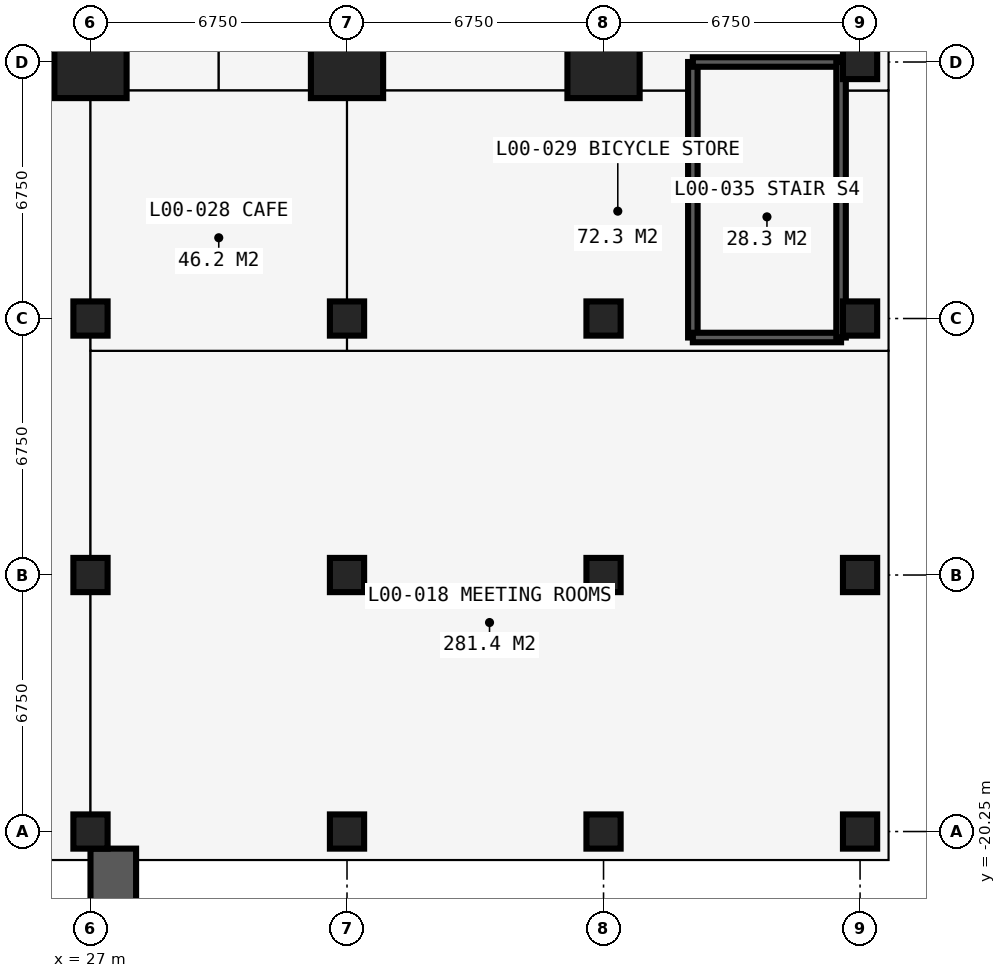
"""IFC4 building model, lengths in metres.
Left out: names, types, materials, properties, quantities, classifications, styles, units other than length and angle.
Written with IfcOpenShell. Run it as: python <this file> out.ifc"""

import sys

from ifc_helpers import new_model, si_unit, direction, frame, frame_2d, origin, origin_2d, place, context, subcontext, project, spatial, rectangle, circle, extrude, element, fill, save


model = new_model("IFC4")
c1 = context("Model", 3, precision=1e-05, world=origin(), true_north=direction((0.0, 1.0)))
c2 = subcontext(c1, "Body", "Model", "MODEL_VIEW")
j1 = project(units=[si_unit("LENGTHUNIT", "METRE"), si_unit("PLANEANGLEUNIT", "RADIAN")], contexts=[c1])
p1 = place(None, origin())
s1 = spatial("IfcSite", under=j1, at=p1, CompositionType="ELEMENT")
p2 = place(p1, origin())
s2 = spatial("IfcBuilding", under=s1, at=p2, CompositionType="ELEMENT")
p3 = place(p2, origin())
s3 = spatial("IfcBuildingStorey", under=s2, at=p3, CompositionType="ELEMENT", Elevation=0.0)
for number, where, z_axis, x_axis in (
    (1, (27.0, -20.25, 0.0), (0.0, 0.0, 1.0), (1.0, 0.0, 0.0)),
    (2, (27.0, -13.5, 0.0), (0.0, 0.0, 1.0), (1.0, 0.0, 0.0)),
    (3, (27.0, -6.75, 0.0), (0.0, 0.0, 1.0), (1.0, 0.0, 0.0)),
):
    element("IfcColumn", number, at=place(p3, frame(where, z_axis=z_axis, x_axis=x_axis)), inside=s3, PredefinedType="COLUMN", context=c2, shape_type="SweptSolid", body=[
        extrude(circle(Radius=0.45, at=origin_2d()), origin(), (0.0, 0.0, 1.0), 4.5),
    ])
p4 = place(p3, frame((27.0, 0.0, 0.0), z_axis=(0.0, 0.0, 1.0), x_axis=(1.0, 0.0, 0.0)))
e4 = element("IfcColumn", 4, at=p4, inside=s3, PredefinedType="COLUMN", context=c2, shape_type="SweptSolid", body=[
    extrude(rectangle(XDim=1.9, YDim=1.9, at=origin_2d()), origin(), (0.0, 0.0, 1.0), 4.5),
])
for number, where, z_axis, x_axis in (
    (5, (33.75, -20.25, 0.0), (0.0, 0.0, 1.0), (1.0, 0.0, 0.0)),
    (6, (33.75, -13.5, 0.0), (0.0, 0.0, 1.0), (1.0, 0.0, 0.0)),
    (7, (33.75, -6.75, 0.0), (0.0, 0.0, 1.0), (1.0, 0.0, 0.0)),
):
    element("IfcColumn", number, at=place(p3, frame(where, z_axis=z_axis, x_axis=x_axis)), inside=s3, PredefinedType="COLUMN", context=c2, shape_type="SweptSolid", body=[
        extrude(circle(Radius=0.45, at=origin_2d()), origin(), (0.0, 0.0, 1.0), 4.5),
    ])
p5 = place(p3, frame((33.75, 0.0, 0.0), z_axis=(0.0, 0.0, 1.0), x_axis=(1.0, 0.0, 0.0)))
e8 = element("IfcColumn", 8, at=p5, inside=s3, PredefinedType="COLUMN", context=c2, shape_type="SweptSolid", body=[
    extrude(rectangle(XDim=1.9, YDim=1.9, at=origin_2d()), origin(), (0.0, 0.0, 1.0), 4.5),
])
for number, where, z_axis, x_axis in (
    (9, (40.5, -20.25, 0.0), (0.0, 0.0, 1.0), (1.0, 0.0, 0.0)),
    (10, (40.5, -13.5, 0.0), (0.0, 0.0, 1.0), (1.0, 0.0, 0.0)),
    (11, (40.5, -6.75, 0.0), (0.0, 0.0, 1.0), (1.0, 0.0, 0.0)),
):
    element("IfcColumn", number, at=place(p3, frame(where, z_axis=z_axis, x_axis=x_axis)), inside=s3, PredefinedType="COLUMN", context=c2, shape_type="SweptSolid", body=[
        extrude(circle(Radius=0.45, at=origin_2d()), origin(), (0.0, 0.0, 1.0), 4.5),
    ])
p6 = place(p3, frame((40.5, 0.0, 0.0), z_axis=(0.0, 0.0, 1.0), x_axis=(1.0, 0.0, 0.0)))
e12 = element("IfcColumn", 12, at=p6, inside=s3, PredefinedType="COLUMN", context=c2, shape_type="SweptSolid", body=[
    extrude(rectangle(XDim=1.9, YDim=1.9, at=origin_2d()), origin(), (0.0, 0.0, 1.0), 4.5),
])
for number, where, z_axis, x_axis in (
    (13, (47.25, -20.25, 0.0), (0.0, 0.0, 1.0), (1.0, 0.0, 0.0)),
    (14, (47.25, -13.5, 0.0), (0.0, 0.0, 1.0), (1.0, 0.0, 0.0)),
    (15, (47.25, -6.75, 0.0), (0.0, 0.0, 1.0), (1.0, 0.0, 0.0)),
    (16, (47.25, 0.0, 0.0), (0.0, 0.0, 1.0), (1.0, 0.0, 0.0)),
):
    element("IfcColumn", number, at=place(p3, frame(where, z_axis=z_axis, x_axis=x_axis)), inside=s3, PredefinedType="COLUMN", context=c2, shape_type="SweptSolid", body=[
        extrude(circle(Radius=0.45, at=origin_2d()), origin(), (0.0, 0.0, 1.0), 4.5),
    ])
p7 = place(p3, frame((48.0, -6.75, 0.0), z_axis=(0.0, 0.0, 1.0), x_axis=(0.0, -1.0, 0.0)))
e17 = element("IfcWall", 17, at=p7, inside=s3, PredefinedType="SOLIDWALL", context=c2, shape_type="SweptSolid", body=[
    extrude(rectangle(XDim=6.75, YDim=0.15, at=frame_2d((3.375, 0.0))), origin(), (0.0, 0.0, 1.0), 4.25),
])
p8 = place(p7, frame((2.625, 0.0, 0.0)))
e18 = element("IfcOpeningElement", 18, at=p8, cuts=e17, PredefinedType="OPENING", context=c2, shape_type="SweptSolid", body=[
    extrude(rectangle(XDim=1.5, YDim=2.4, at=frame_2d((0.75, 1.2))), frame((0.0, 0.085, 0.0), z_axis=(0.0, -1.0, 0.0), x_axis=(1.0, 0.0, 0.0)), (0.0, 0.0, 1.0), 0.17),
])
p9 = place(p3, frame((48.0, 0.0, 0.0), z_axis=(0.0, 0.0, 1.0), x_axis=(0.0, -1.0, 0.0)))
e19 = element("IfcWall", 19, at=p9, inside=s3, PredefinedType="SOLIDWALL", context=c2, shape_type="SweptSolid", body=[
    extrude(rectangle(XDim=6.75, YDim=0.15, at=frame_2d((3.375, 0.0))), origin(), (0.0, 0.0, 1.0), 4.25),
])
p10 = place(p9, frame((5.075, 0.0, 0.0)))
e20 = element("IfcOpeningElement", 20, at=p10, cuts=e19, PredefinedType="OPENING", context=c2, shape_type="SweptSolid", body=[
    extrude(rectangle(XDim=1.2, YDim=2.4, at=frame_2d((0.6, 1.2))), frame((0.0, 0.085, 0.0), z_axis=(0.0, -1.0, 0.0), x_axis=(1.0, 0.0, 0.0)), (0.0, 0.0, 1.0), 0.17),
])
p11 = place(p3, frame((27.0, -21.0, 0.0), z_axis=(0.0, 0.0, 1.0), x_axis=(-1.0, 0.0, 0.0)))
e21 = element("IfcWall", 21, at=p11, inside=s3, PredefinedType="SOLIDWALL", context=c2, shape_type="SweptSolid", body=[
    extrude(rectangle(XDim=6.75, YDim=0.15, at=frame_2d((3.375, 0.0))), origin(), (0.0, 0.0, 1.0), 4.25),
])
p12 = place(p11, frame((0.788, 0.0, 0.0)))
e22 = element("IfcOpeningElement", 22, at=p12, cuts=e21, PredefinedType="OPENING", context=c2, shape_type="SweptSolid", body=[
    extrude(rectangle(XDim=1.8, YDim=2.7, at=frame_2d((0.9, 1.35))), frame((0.0, 0.085, 0.0), z_axis=(0.0, -1.0, 0.0), x_axis=(1.0, 0.0, 0.0)), (0.0, 0.0, 1.0), 0.17),
])
p13 = place(p11, frame((4.163, 0.0, 0.0)))
e23 = element("IfcOpeningElement", 23, at=p13, cuts=e21, PredefinedType="OPENING", context=c2, shape_type="SweptSolid", body=[
    extrude(rectangle(XDim=1.8, YDim=2.7, at=frame_2d((0.9, 1.35))), frame((0.0, 0.085, 0.0), z_axis=(0.0, -1.0, 0.0), x_axis=(1.0, 0.0, 0.0)), (0.0, 0.0, 1.0), 0.17),
])
p14 = place(p3, frame((27.6, -20.7, 0.0), z_axis=(0.0, 0.0, 1.0), x_axis=(0.0, -1.0, 0.0)))
e24 = element("IfcWall", 24, at=p14, inside=s3, PredefinedType="USERDEFINED", context=c2, shape_type="SweptSolid", body=[
    extrude(rectangle(XDim=2.8, YDim=1.2, at=frame_2d((1.4, 0.0))), origin(), (0.0, 0.0, 1.0), 9.0),
])
p15 = place(p3, frame((27.0, -20.984, 0.0), z_axis=(0.0, 0.0, 1.0), x_axis=(0.0, 1.0, 0.0)))
e25 = element("IfcWall", 25, at=p15, inside=s3, PredefinedType="PARTITIONING", context=c2, shape_type="SweptSolid", body=[
    extrude(rectangle(XDim=20.234, YDim=0.15, at=frame_2d((10.117, 0.0))), origin(), (0.0, 0.0, 1.0), 3.752),
])
p16 = place(p15, frame((5.225, 0.0, 0.0)))
e26 = element("IfcOpeningElement", 26, at=p16, cuts=e25, PredefinedType="OPENING", context=c2, shape_type="SweptSolid", body=[
    extrude(rectangle(XDim=1.6, YDim=2.4, at=frame_2d((0.8, 1.2))), frame((0.0, 0.085, 0.0), z_axis=(0.0, -1.0, 0.0), x_axis=(1.0, 0.0, 0.0)), (0.0, 0.0, 1.0), 0.17),
])
p17 = place(p15, frame((15.984, 0.0, 0.0)))
e27 = element("IfcOpeningElement", 27, at=p17, cuts=e25, PredefinedType="OPENING", context=c2, shape_type="SweptSolid", body=[
    extrude(rectangle(XDim=1.6, YDim=2.4, at=frame_2d((0.8, 1.2))), frame((0.0, 0.085, 0.0), z_axis=(0.0, -1.0, 0.0), x_axis=(1.0, 0.0, 0.0)), (0.0, 0.0, 1.0), 0.17),
])
p18 = place(p3, frame((27.0, -7.6, 0.0), z_axis=(0.0, 0.0, 1.0), x_axis=(1.0, 0.0, 0.0)))
e28 = element("IfcWall", 28, at=p18, inside=s3, PredefinedType="PARTITIONING", context=c2, shape_type="SweptSolid", body=[
    extrude(rectangle(XDim=20.984, YDim=0.15, at=frame_2d((10.492, 0.0))), origin(), (0.0, 0.0, 1.0), 4.25),
])
p19 = place(p18, frame((14.0, 0.0, 0.0)))
e29 = element("IfcOpeningElement", 29, at=p19, cuts=e28, PredefinedType="OPENING", context=c2, shape_type="SweptSolid", body=[
    extrude(rectangle(XDim=0.95, YDim=2.2, at=frame_2d((0.475, 1.1))), frame((0.0, 0.085, 0.0), z_axis=(0.0, -1.0, 0.0), x_axis=(1.0, 0.0, 0.0)), (0.0, 0.0, 1.0), 0.17),
])
p20 = place(p3, frame((27.0, -0.75, 0.0), z_axis=(0.0, 0.0, 1.0), x_axis=(1.0, 0.0, 0.0)))
e30 = element("IfcWall", 30, at=p20, inside=s3, PredefinedType="PARTITIONING", context=c2, shape_type="SweptSolid", body=[
    extrude(rectangle(XDim=15.85, YDim=0.15, at=frame_2d((7.925, 0.0))), origin(), (0.0, 0.0, 1.0), 4.25),
])
p21 = place(p3, frame((30.375, -0.75, 0.0), z_axis=(0.0, 0.0, 1.0), x_axis=(0.0, 1.0, 0.0)))
e31 = element("IfcWall", 31, at=p21, inside=s3, PredefinedType="PARTITIONING", context=c2, shape_type="SweptSolid", body=[
    extrude(rectangle(XDim=12.05, YDim=0.15, at=frame_2d((6.025, 0.0))), origin(), (0.0, 0.0, 1.0), 4.25),
])
p22 = place(p3, frame((33.75, -7.6, 0.0), z_axis=(0.0, 0.0, 1.0), x_axis=(0.0, 1.0, 0.0)))
e32 = element("IfcWall", 32, at=p22, inside=s3, PredefinedType="PARTITIONING", context=c2, shape_type="SweptSolid", body=[
    extrude(rectangle(XDim=6.85, YDim=0.15, at=frame_2d((3.425, 0.0))), origin(), (0.0, 0.0, 1.0), 3.752),
])
p23 = place(p3, frame((41.25, -0.75, 0.0), z_axis=(0.0, 0.0, 1.0), x_axis=(0.0, 1.0, 0.0)))
e33 = element("IfcWall", 33, at=p23, inside=s3, PredefinedType="PARTITIONING", context=c2, shape_type="SweptSolid", body=[
    extrude(rectangle(XDim=41.984, YDim=0.15, at=frame_2d((20.992, 0.0))), origin(), (0.0, 0.0, 1.0), 4.25),
])
p24 = place(p23, frame((9.7, 0.0, 0.0)))
e34 = element("IfcOpeningElement", 34, at=p24, cuts=e33, PredefinedType="OPENING", context=c2, shape_type="SweptSolid", body=[
    extrude(rectangle(XDim=1.6, YDim=2.4, at=frame_2d((0.8, 1.2))), frame((0.0, 0.085, 0.0), z_axis=(0.0, -1.0, 0.0), x_axis=(1.0, 0.0, 0.0)), (0.0, 0.0, 1.0), 0.17),
])
p25 = place(p23, frame((25.15, 0.0, 0.0)))
e35 = element("IfcOpeningElement", 35, at=p25, cuts=e33, PredefinedType="OPENING", context=c2, shape_type="SweptSolid", body=[
    extrude(rectangle(XDim=1.6, YDim=2.4, at=frame_2d((0.8, 1.2))), frame((0.0, 0.085, 0.0), z_axis=(0.0, -1.0, 0.0), x_axis=(1.0, 0.0, 0.0)), (0.0, 0.0, 1.0), 0.17),
])
p26 = place(p3, frame((42.85, -7.25, 0.0), z_axis=(0.0, 0.0, 1.0), x_axis=(0.0, 1.0, 0.0)))
e36 = element("IfcWall", 36, at=p26, inside=s3, PredefinedType="SOLIDWALL", context=c2, shape_type="SweptSolid", body=[
    extrude(rectangle(XDim=7.25, YDim=0.25, at=frame_2d((3.625, 0.0))), origin(), (0.0, 0.0, 1.0), 4.25),
])
for number, where, z_axis, x_axis in (
    (37, (42.85, -7.25, 0.0), (0.0, 0.0, 1.0), (1.0, 0.0, 0.0)),
    (38, (42.85, 0.0, 0.0), (0.0, 0.0, 1.0), (1.0, 0.0, 0.0)),
):
    element("IfcWall", number, at=place(p3, frame(where, z_axis=z_axis, x_axis=x_axis)), inside=s3, PredefinedType="SOLIDWALL", context=c2, shape_type="SweptSolid", body=[
        extrude(rectangle(XDim=3.9, YDim=0.25, at=frame_2d((1.95, 0.0))), origin(), (0.0, 0.0, 1.0), 4.25),
    ])
p27 = place(p3, frame((46.75, -7.25, 0.0), z_axis=(0.0, 0.0, 1.0), x_axis=(0.0, 1.0, 0.0)))
e39 = element("IfcWall", 39, at=p27, inside=s3, PredefinedType="SOLIDWALL", context=c2, shape_type="SweptSolid", body=[
    extrude(rectangle(XDim=7.25, YDim=0.25, at=frame_2d((3.625, 0.0))), origin(), (0.0, 0.0, 1.0), 4.25),
])
p28 = place(p3, frame((46.75, -0.75, 0.0), z_axis=(0.0, 0.0, 1.0), x_axis=(1.0, 0.0, 0.0)))
e40 = element("IfcWall", 40, at=p28, inside=s3, PredefinedType="PARTITIONING", context=c2, shape_type="SweptSolid", body=[
    extrude(rectangle(XDim=1.234, YDim=0.15, at=frame_2d((0.617, 0.0))), origin(), (0.0, 0.0, 1.0), 4.25),
])
p29 = place(p8, origin())
e41 = element("IfcDoor", 41, at=p29, inside=s3, OperationType="DOUBLE_DOOR_SINGLE_SWING", PredefinedType="DOOR", context=c2, shape_type="SweptSolid", body=[
    extrude(rectangle(XDim=1.5, YDim=2.4, at=frame_2d((0.75, 1.2))), frame((0.0, 0.025, 0.0), z_axis=(0.0, -1.0, 0.0), x_axis=(1.0, 0.0, 0.0)), (0.0, 0.0, 1.0), 0.05),
])
fill(e18, e41)
p30 = place(p10, origin())
e42 = element("IfcDoor", 42, at=p30, inside=s3, OperationType="SINGLE_SWING_LEFT", PredefinedType="DOOR", context=c2, shape_type="SweptSolid", body=[
    extrude(rectangle(XDim=1.2, YDim=2.4, at=frame_2d((0.6, 1.2))), frame((0.0, 0.025, 0.0), z_axis=(0.0, -1.0, 0.0), x_axis=(1.0, 0.0, 0.0)), (0.0, 0.0, 1.0), 0.05),
])
fill(e20, e42)
p31 = place(p12, origin())
e43 = element("IfcDoor", 43, at=p31, inside=s3, OperationType="DOUBLE_DOOR_SINGLE_SWING", PredefinedType="DOOR", context=c2, shape_type="SweptSolid", body=[
    extrude(rectangle(XDim=1.8, YDim=2.7, at=frame_2d((0.9, 1.35))), frame((0.0, 0.025, 0.0), z_axis=(0.0, -1.0, 0.0), x_axis=(1.0, 0.0, 0.0)), (0.0, 0.0, 1.0), 0.05),
])
fill(e22, e43)
p32 = place(p16, origin())
e44 = element("IfcDoor", 44, at=p32, inside=s3, OperationType="DOUBLE_DOOR_SINGLE_SWING", PredefinedType="DOOR", context=c2, shape_type="SweptSolid", body=[
    extrude(rectangle(XDim=1.6, YDim=2.4, at=frame_2d((0.8, 1.2))), frame((0.0, 0.025, 0.0), z_axis=(0.0, -1.0, 0.0), x_axis=(1.0, 0.0, 0.0)), (0.0, 0.0, 1.0), 0.05),
])
fill(e26, e44)
p33 = place(p17, origin())
e45 = element("IfcDoor", 45, at=p33, inside=s3, OperationType="DOUBLE_DOOR_SINGLE_SWING", PredefinedType="DOOR", context=c2, shape_type="SweptSolid", body=[
    extrude(rectangle(XDim=1.6, YDim=2.4, at=frame_2d((0.8, 1.2))), frame((0.0, 0.025, 0.0), z_axis=(0.0, -1.0, 0.0), x_axis=(1.0, 0.0, 0.0)), (0.0, 0.0, 1.0), 0.05),
])
fill(e27, e45)
p34 = place(p19, origin())
e46 = element("IfcDoor", 46, at=p34, inside=s3, OperationType="SINGLE_SWING_LEFT", PredefinedType="DOOR", context=c2, shape_type="SweptSolid", body=[
    extrude(rectangle(XDim=0.95, YDim=2.2, at=frame_2d((0.475, 1.1))), frame((0.0, 0.025, 0.0), z_axis=(0.0, -1.0, 0.0), x_axis=(1.0, 0.0, 0.0)), (0.0, 0.0, 1.0), 0.05),
])
fill(e29, e46)
save(model, sys.argv[1])
